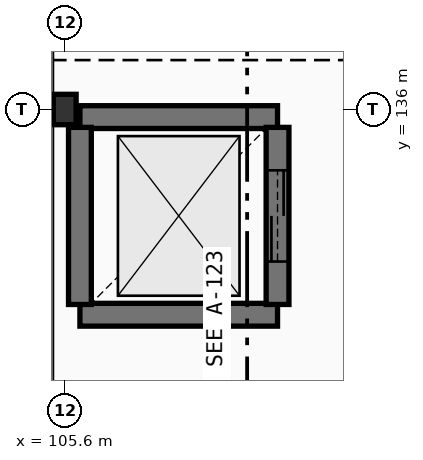
"""IFC4 building model, lengths in metres.
Left out: names, types, materials, properties, quantities, classifications, styles, units other than length and angle.
Written with IfcOpenShell. Run it as: python <this file> out.ifc"""

import sys

from ifc_helpers import new_model, si_unit, direction, frame, frame_2d, origin, origin_2d, place, context, subcontext, project, spatial, rectangle, i_section, extrude, element, fill, save


model = new_model("IFC4")
c1 = context("Model", 3, precision=1e-05, world=origin(), true_north=direction((0.0, 1.0)))
c2 = subcontext(c1, "Body", "Model", "MODEL_VIEW")
j1 = project(units=[si_unit("LENGTHUNIT", "METRE"), si_unit("PLANEANGLEUNIT", "RADIAN")], contexts=[c1])
p1 = place(None, origin())
s1 = spatial("IfcSite", under=j1, at=p1, CompositionType="ELEMENT")
p2 = place(p1, origin())
s2 = spatial("IfcBuilding", under=s1, at=p2, CompositionType="ELEMENT")
p3 = place(p2, origin())
s3 = spatial("IfcBuildingStorey", under=s2, at=p3, CompositionType="ELEMENT", Elevation=0.0)
p4 = place(p3, frame((105.6, 136.0, 0.0), z_axis=(0.0, 0.0, 1.0), x_axis=(1.0, 0.0, 0.0)))
e1 = element("IfcColumn", 1, at=p4, inside=s3, PredefinedType="COLUMN", context=c2, shape_type="SweptSolid", body=[
    extrude(i_section(OverallWidth=0.3, OverallDepth=0.4, WebThickness=0.013, FlangeThickness=0.024, FilletRadius=0.027, at=origin_2d()), origin(), (0.0, 0.0, 1.0), 6.0),
])
for number, where, z_axis, x_axis in (
    (2, (108.4, 135.9, 0.0), (0.0, 0.0, 1.0), (-1.0, 0.0, 0.0)),
    (3, (105.8, 133.3, 0.0), (0.0, 0.0, 1.0), (1.0, 0.0, 0.0)),
):
    element("IfcWall", number, at=place(p3, frame(where, z_axis=z_axis, x_axis=x_axis)), inside=s3, PredefinedType="SHEAR", context=c2, shape_type="SweptSolid", body=[
        extrude(rectangle(XDim=2.6, YDim=0.3, at=frame_2d((1.3, 0.0))), origin(), (0.0, 0.0, 1.0), 5.75),
    ])
p5 = place(p3, frame((108.4, 133.435, 0.0), z_axis=(0.0, 0.0, 1.0), x_axis=(0.0, 1.0, 0.0)))
e4 = element("IfcWall", 4, at=p5, inside=s3, PredefinedType="SHEAR", context=c2, shape_type="SweptSolid", body=[
    extrude(rectangle(XDim=2.33, YDim=0.3, at=frame_2d((1.165, 0.0))), origin(), (0.0, 0.0, 1.0), 5.75),
])
p6 = place(p5, frame((0.565, 0.0, 0.0)))
e5 = element("IfcOpeningElement", 5, at=p6, cuts=e4, PredefinedType="OPENING", context=c2, shape_type="SweptSolid", body=[
    extrude(rectangle(XDim=1.2, YDim=2.2, at=frame_2d((0.6, 1.1))), frame((0.0, 0.16, 0.0), z_axis=(0.0, -1.0, 0.0), x_axis=(1.0, 0.0, 0.0)), (0.0, 0.0, 1.0), 0.32),
])
p7 = place(p3, frame((105.8, 135.765, 0.0), z_axis=(0.0, 0.0, 1.0), x_axis=(0.0, -1.0, 0.0)))
e6 = element("IfcWall", 6, at=p7, inside=s3, PredefinedType="SHEAR", context=c2, shape_type="SweptSolid", body=[
    extrude(rectangle(XDim=2.33, YDim=0.3, at=frame_2d((1.165, 0.0))), origin(), (0.0, 0.0, 1.0), 5.75),
])
p8 = place(p6, origin())
e7 = element("IfcDoor", 7, at=p8, inside=s3, OperationType="DOUBLE_DOOR_SLIDING", PredefinedType="DOOR", context=c2, shape_type="SweptSolid", body=[
    extrude(rectangle(XDim=1.2, YDim=2.2, at=frame_2d((0.6, 1.1))), frame((0.0, 0.025, 0.0), z_axis=(0.0, -1.0, 0.0), x_axis=(1.0, 0.0, 0.0)), (0.0, 0.0, 1.0), 0.05),
])
fill(e5, e7)
save(model, sys.argv[1])
